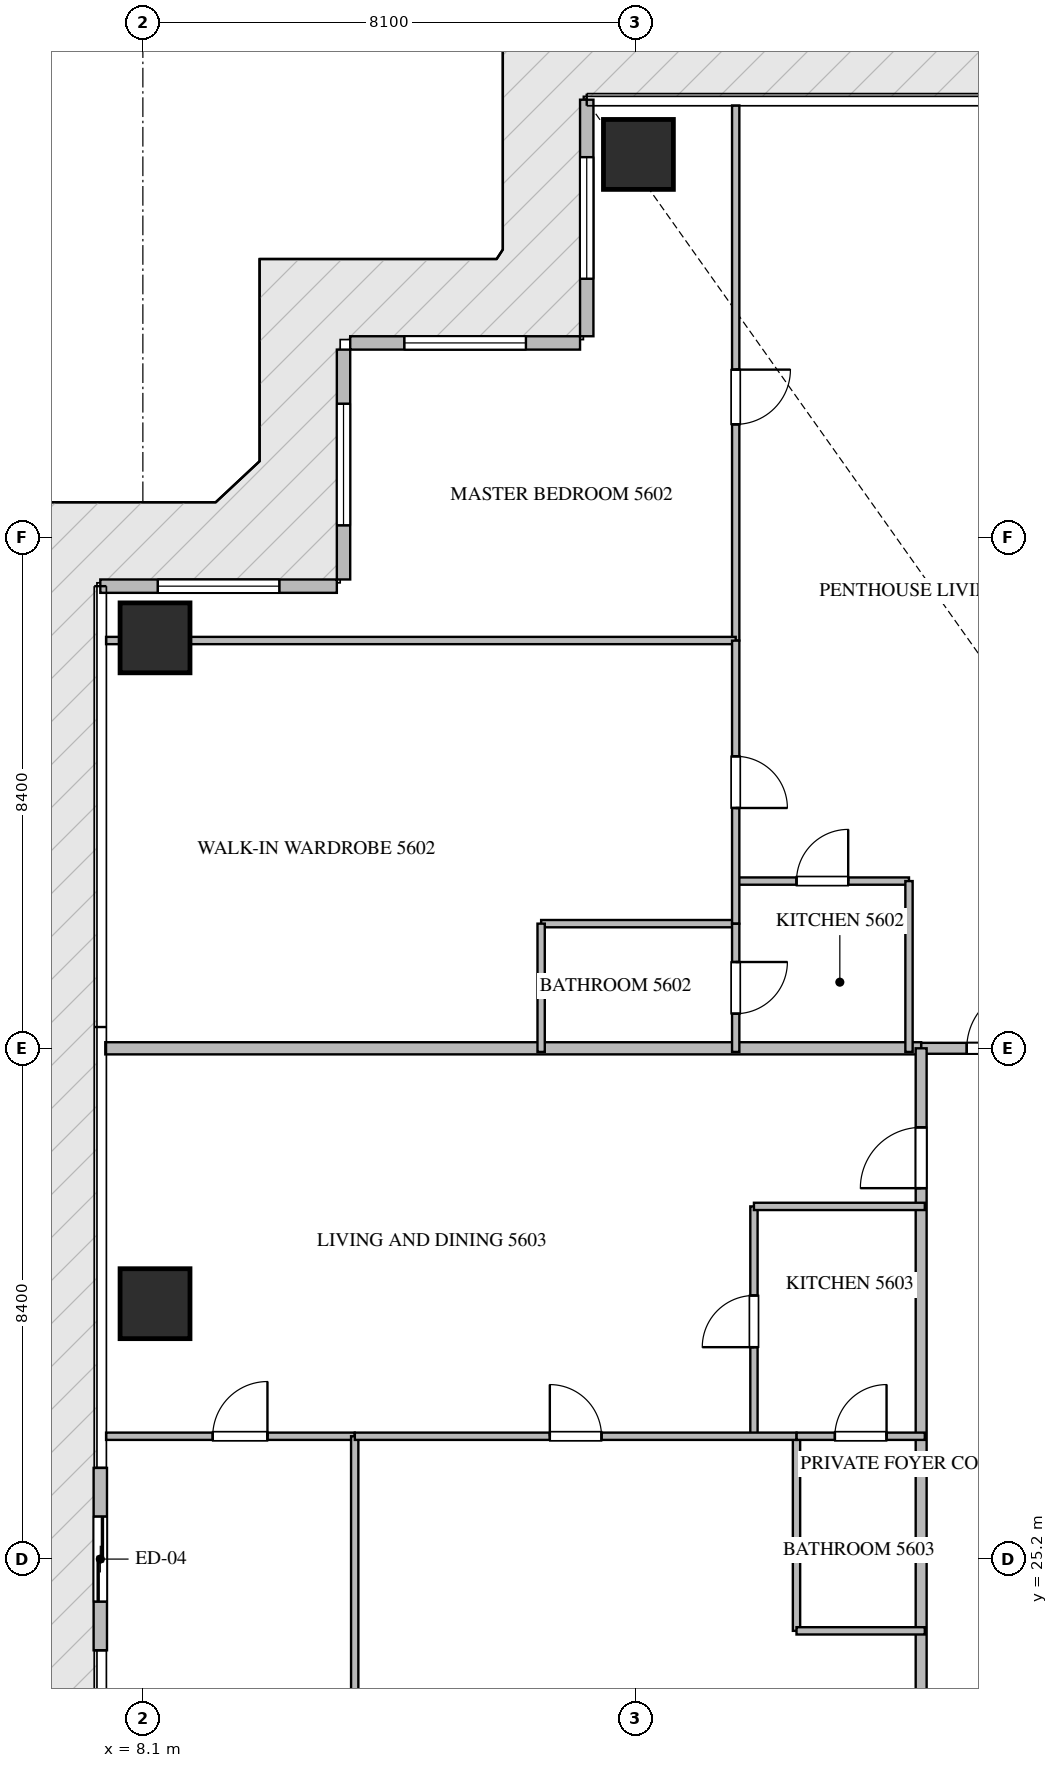
"""IFC4 building model, lengths in metres.
Left out: names, types, materials, properties, quantities, classifications, styles, units other than length and angle.
Written with IfcOpenShell. Run it as: python <this file> out.ifc"""

import sys

from ifc_helpers import new_model, si_unit, direction, frame, frame_2d, origin, origin_2d, place, context, subcontext, project, spatial, rectangle, extrude, source, transform, mapped, element, fill, save


model = new_model("IFC4")
c1 = context("Model", 3, precision=1e-05, world=origin(), true_north=direction((0.0, 1.0)))
c2 = subcontext(c1, "Body", "Model", "MODEL_VIEW")
j1 = project(units=[si_unit("LENGTHUNIT", "METRE"), si_unit("PLANEANGLEUNIT", "RADIAN")], contexts=[c1])
p1 = place(None, origin())
s1 = spatial("IfcSite", under=j1, at=p1, CompositionType="ELEMENT")
p2 = place(p1, origin())
s2 = spatial("IfcBuilding", under=s1, at=p2, CompositionType="ELEMENT")
p3 = place(p2, frame((0.0, 0.0, 225.85)))
s3 = spatial("IfcBuildingStorey", under=s2, at=p3, CompositionType="ELEMENT", Elevation=225.85)
m1 = source(origin(), c2, "Body", "SweptSolid", [
    extrude(rectangle(XDim=1.15, YDim=1.15, at=origin_2d()), origin(), (0.0, 0.0, 1.0), 3.85),
])
for number, where, z_axis, x_axis in (
    (1, (16.25, 48.3, -0.26), (0.0, 0.0, 1.0), (1.0, 0.0, 0.0)),
    (2, (8.3, 29.4, -0.26), (0.0, 0.0, 1.0), (1.0, 0.0, 0.0)),
    (3, (8.3, 40.35, -0.26), (0.0, 0.0, 1.0), (1.0, 0.0, 0.0)),
):
    element("IfcColumn", number, at=place(p3, frame(where, z_axis=z_axis, x_axis=x_axis)), inside=s3, PredefinedType="COLUMN", context=c2, shape_type="MappedRepresentation", body=[
        mapped(m1, transform((0.0, 0.0, 0.0), scale=1.0)),
    ])
p4 = place(p3, frame((15.4, 49.2, 0.0), z_axis=(0.0, 0.0, 1.0), x_axis=(0.0, -1.0, 0.0)))
e4 = element("IfcWall", 4, at=p4, inside=s3, PredefinedType="ELEMENTEDWALL", context=c2, shape_type="SweptSolid", body=[
    extrude(rectangle(XDim=3.89, YDim=0.22, at=frame_2d((1.945, 0.0))), origin(), (0.0, 0.0, 1.0), 3.575),
])
p5 = place(p4, frame((0.945, 0.0, 0.65)))
e5 = element("IfcOpeningElement", 5, at=p5, cuts=e4, PredefinedType="OPENING", context=c2, shape_type="SweptSolid", body=[
    extrude(rectangle(XDim=2.0, YDim=2.2, at=frame_2d((1.0, 1.1))), frame((0.0, 0.12, 0.0), z_axis=(0.0, -1.0, 0.0), x_axis=(1.0, 0.0, 0.0)), (0.0, 0.0, 1.0), 0.24),
])
p6 = place(p3, frame((15.29, 45.2, 0.0), z_axis=(0.0, 0.0, 1.0), x_axis=(-1.0, 0.0, 0.0)))
e6 = element("IfcWall", 6, at=p6, inside=s3, PredefinedType="ELEMENTEDWALL", context=c2, shape_type="SweptSolid", body=[
    extrude(rectangle(XDim=3.78, YDim=0.22, at=frame_2d((1.89, 0.0))), origin(), (0.0, 0.0, 1.0), 3.575),
])
p7 = place(p6, frame((0.89, 0.0, 0.65)))
e7 = element("IfcOpeningElement", 7, at=p7, cuts=e6, PredefinedType="OPENING", context=c2, shape_type="SweptSolid", body=[
    extrude(rectangle(XDim=2.0, YDim=2.2, at=frame_2d((1.0, 1.1))), frame((0.0, 0.12, 0.0), z_axis=(0.0, -1.0, 0.0), x_axis=(1.0, 0.0, 0.0)), (0.0, 0.0, 1.0), 0.24),
])
p8 = place(p3, frame((11.4, 45.09, 0.0), z_axis=(0.0, 0.0, 1.0), x_axis=(0.0, -1.0, 0.0)))
e8 = element("IfcWall", 8, at=p8, inside=s3, PredefinedType="ELEMENTEDWALL", context=c2, shape_type="SweptSolid", body=[
    extrude(rectangle(XDim=3.78, YDim=0.22, at=frame_2d((1.89, 0.0))), origin(), (0.0, 0.0, 1.0), 3.575),
])
p9 = place(p8, frame((0.89, 0.0, 0.65)))
e9 = element("IfcOpeningElement", 9, at=p9, cuts=e8, PredefinedType="OPENING", context=c2, shape_type="SweptSolid", body=[
    extrude(rectangle(XDim=2.0, YDim=2.2, at=frame_2d((1.0, 1.1))), frame((0.0, 0.12, 0.0), z_axis=(0.0, -1.0, 0.0), x_axis=(1.0, 0.0, 0.0)), (0.0, 0.0, 1.0), 0.24),
])
p10 = place(p3, frame((11.29, 41.2, 0.0), z_axis=(0.0, 0.0, 1.0), x_axis=(-1.0, 0.0, 0.0)))
e10 = element("IfcWall", 10, at=p10, inside=s3, PredefinedType="ELEMENTEDWALL", context=c2, shape_type="SweptSolid", body=[
    extrude(rectangle(XDim=3.89, YDim=0.22, at=frame_2d((1.945, 0.0))), origin(), (0.0, 0.0, 1.0), 3.575),
])
p11 = place(p10, frame((0.945, 0.0, 0.65)))
e11 = element("IfcOpeningElement", 11, at=p11, cuts=e10, PredefinedType="OPENING", context=c2, shape_type="SweptSolid", body=[
    extrude(rectangle(XDim=2.0, YDim=2.2, at=frame_2d((1.0, 1.1))), frame((0.0, 0.12, 0.0), z_axis=(0.0, -1.0, 0.0), x_axis=(1.0, 0.0, 0.0)), (0.0, 0.0, 1.0), 0.24),
])
p12 = place(p3, frame((7.4, 26.7, 0.0), z_axis=(0.0, 0.0, 1.0), x_axis=(0.0, -1.0, 0.0)))
e12 = element("IfcWall", 12, at=p12, inside=s3, PredefinedType="ELEMENTEDWALL", context=c2, shape_type="SweptSolid", body=[
    extrude(rectangle(XDim=3.0, YDim=0.22, at=frame_2d((1.5, 0.0))), origin(), (0.0, 0.0, 1.0), 3.575),
])
p13 = place(p12, frame((0.8, 0.0, 0.0)))
e13 = element("IfcOpeningElement", 13, at=p13, cuts=e12, PredefinedType="OPENING", context=c2, shape_type="SweptSolid", body=[
    extrude(rectangle(XDim=1.4, YDim=2.25, at=frame_2d((0.7, 1.125))), frame((0.0, 0.12, 0.0), z_axis=(0.0, -1.0, 0.0), x_axis=(1.0, 0.0, 0.0)), (0.0, 0.0, 1.0), 0.24),
])
p14 = place(p3, frame((7.482, 33.6, 0.0), z_axis=(0.0, 0.0, 1.0), x_axis=(1.0, 0.0, 0.0)))
e14 = element("IfcWall", 14, at=p14, inside=s3, PredefinedType="PARTITIONING", context=c2, shape_type="SweptSolid", body=[
    extrude(rectangle(XDim=13.418, YDim=0.2, at=frame_2d((6.709, 0.0))), origin(), (0.0, 0.0, 1.0), 3.59),
])
p15 = place(p3, frame((20.902, 33.6, 0.0), z_axis=(0.0, 0.0, 1.0), x_axis=(1.0, 0.0, 0.0)))
e15 = element("IfcWall", 15, at=p15, inside=s3, PredefinedType="PARTITIONING", context=c2, shape_type="SweptSolid", body=[
    extrude(rectangle(XDim=2.496, YDim=0.18, at=frame_2d((1.248, 0.0))), origin(), (0.0, 0.0, 1.0), 3.59),
])
p16 = place(p15, frame((0.748, 0.0, 0.0)))
e16 = element("IfcOpeningElement", 16, at=p16, cuts=e15, PredefinedType="OPENING", context=c2, shape_type="SweptSolid", body=[
    extrude(rectangle(XDim=1.0, YDim=2.15, at=frame_2d((0.5, 1.075))), frame((0.0, 0.1, 0.0), z_axis=(0.0, -1.0, 0.0), x_axis=(1.0, 0.0, 0.0)), (0.0, 0.0, 1.0), 0.2),
])
p17 = place(p3, frame((20.9, 16.8, 0.0), z_axis=(0.0, 0.0, 1.0), x_axis=(0.0, 1.0, 0.0)))
e17 = element("IfcWall", 17, at=p17, inside=s3, PredefinedType="PARTITIONING", context=c2, shape_type="SweptSolid", body=[
    extrude(rectangle(XDim=16.8, YDim=0.18, at=frame_2d((8.4, 0.0))), origin(), (0.0, 0.0, 1.0), 3.59),
])
p18 = place(p17, frame((14.5, 0.0, 0.0)))
e18 = element("IfcOpeningElement", 18, at=p18, cuts=e17, PredefinedType="OPENING", context=c2, shape_type="SweptSolid", body=[
    extrude(rectangle(XDim=1.0, YDim=2.15, at=frame_2d((0.5, 1.075))), frame((0.0, 0.1, 0.0), z_axis=(0.0, -1.0, 0.0), x_axis=(1.0, 0.0, 0.0)), (0.0, 0.0, 1.0), 0.2),
])
p19 = place(p3, frame((17.85, 36.35, 0.0), z_axis=(0.0, 0.0, 1.0), x_axis=(1.0, 0.0, 0.0)))
e19 = element("IfcWall", 19, at=p19, inside=s3, PredefinedType="PARTITIONING", context=c2, shape_type="SweptSolid", body=[
    extrude(rectangle(XDim=2.85, YDim=0.12, at=frame_2d((1.425, 0.0))), origin(), (0.0, 0.0, 1.0), 3.59),
])
p20 = place(p19, frame((1.0, 0.0, 0.0)))
e20 = element("IfcOpeningElement", 20, at=p20, cuts=e19, PredefinedType="OPENING", context=c2, shape_type="SweptSolid", body=[
    extrude(rectangle(XDim=0.85, YDim=2.1, at=frame_2d((0.425, 1.05))), frame((0.0, 0.07, 0.0), z_axis=(0.0, -1.0, 0.0), x_axis=(1.0, 0.0, 0.0)), (0.0, 0.0, 1.0), 0.14),
])
p21 = place(p3, frame((20.7, 36.35, 0.0), z_axis=(0.0, 0.0, 1.0), x_axis=(0.0, -1.0, 0.0)))
e21 = element("IfcWall", 21, at=p21, inside=s3, PredefinedType="PARTITIONING", context=c2, shape_type="SweptSolid", body=[
    extrude(rectangle(XDim=2.81, YDim=0.12, at=frame_2d((1.405, 0.0))), origin(), (0.0, 0.0, 1.0), 3.59),
])
p22 = place(p3, frame((17.85, 49.105, 0.0), z_axis=(0.0, 0.0, 1.0), x_axis=(0.0, -1.0, 0.0)))
e22 = element("IfcWall", 22, at=p22, inside=s3, PredefinedType="PARTITIONING", context=c2, shape_type="SweptSolid", body=[
    extrude(rectangle(XDim=8.799, YDim=0.12, at=frame_2d((4.399, 0.0))), origin(), (0.0, 0.0, 1.0), 3.59),
])
p23 = place(p22, frame((4.344, 0.0, 0.0)))
e23 = element("IfcOpeningElement", 23, at=p23, cuts=e22, PredefinedType="OPENING", context=c2, shape_type="SweptSolid", body=[
    extrude(rectangle(XDim=0.9, YDim=2.1, at=frame_2d((0.45, 1.05))), frame((0.0, 0.07, 0.0), z_axis=(0.0, -1.0, 0.0), x_axis=(1.0, 0.0, 0.0)), (0.0, 0.0, 1.0), 0.14),
])
p24 = place(p3, frame((7.495, 40.306, 0.0), z_axis=(0.0, 0.0, 1.0), x_axis=(1.0, 0.0, 0.0)))
e24 = element("IfcWall", 24, at=p24, inside=s3, PredefinedType="PARTITIONING", context=c2, shape_type="SweptSolid", body=[
    extrude(rectangle(XDim=10.355, YDim=0.12, at=frame_2d((5.177, 0.0))), origin(), (0.0, 0.0, 1.0), 3.122),
])
p25 = place(p3, frame((14.65, 35.65, 0.0), z_axis=(0.0, 0.0, 1.0), x_axis=(1.0, 0.0, 0.0)))
e25 = element("IfcWall", 25, at=p25, inside=s3, PredefinedType="PARTITIONING", context=c2, shape_type="SweptSolid", body=[
    extrude(rectangle(XDim=3.2, YDim=0.12, at=frame_2d((1.6, 0.0))), origin(), (0.0, 0.0, 1.0), 3.59),
])
p26 = place(p3, frame((14.65, 35.65, 0.0), z_axis=(0.0, 0.0, 1.0), x_axis=(0.0, -1.0, 0.0)))
e26 = element("IfcWall", 26, at=p26, inside=s3, PredefinedType="PARTITIONING", context=c2, shape_type="SweptSolid", body=[
    extrude(rectangle(XDim=2.11, YDim=0.12, at=frame_2d((1.055, 0.0))), origin(), (0.0, 0.0, 1.0), 3.59),
])
p27 = place(p3, frame((17.85, 40.304, 0.0), z_axis=(0.0, 0.0, 1.0), x_axis=(0.0, -1.0, 0.0)))
e27 = element("IfcWall", 27, at=p27, inside=s3, PredefinedType="PARTITIONING", context=c2, shape_type="SweptSolid", body=[
    extrude(rectangle(XDim=4.654, YDim=0.12, at=frame_2d((2.327, 0.0))), origin(), (0.0, 0.0, 1.0), 3.59),
])
p28 = place(p27, frame((1.902, 0.0, 0.0)))
e28 = element("IfcOpeningElement", 28, at=p28, cuts=e27, PredefinedType="OPENING", context=c2, shape_type="SweptSolid", body=[
    extrude(rectangle(XDim=0.85, YDim=2.1, at=frame_2d((0.425, 1.05))), frame((0.0, 0.07, 0.0), z_axis=(0.0, -1.0, 0.0), x_axis=(1.0, 0.0, 0.0)), (0.0, 0.0, 1.0), 0.14),
])
p29 = place(p3, frame((17.85, 35.648, 0.0), z_axis=(0.0, 0.0, 1.0), x_axis=(0.0, -1.0, 0.0)))
e29 = element("IfcWall", 29, at=p29, inside=s3, PredefinedType="PARTITIONING", context=c2, shape_type="SweptSolid", body=[
    extrude(rectangle(XDim=2.108, YDim=0.12, at=frame_2d((1.054, 0.0))), origin(), (0.0, 0.0, 1.0), 3.59),
])
p30 = place(p29, frame((0.629, 0.0, 0.0)))
e30 = element("IfcOpeningElement", 30, at=p30, cuts=e29, PredefinedType="OPENING", context=c2, shape_type="SweptSolid", body=[
    extrude(rectangle(XDim=0.85, YDim=2.1, at=frame_2d((0.425, 1.05))), frame((0.0, 0.07, 0.0), z_axis=(0.0, -1.0, 0.0), x_axis=(1.0, 0.0, 0.0)), (0.0, 0.0, 1.0), 0.14),
])
p31 = place(p3, frame((18.15, 27.22, 0.0), z_axis=(0.0, 0.0, 1.0), x_axis=(0.0, 1.0, 0.0)))
e31 = element("IfcWall", 31, at=p31, inside=s3, PredefinedType="PARTITIONING", context=c2, shape_type="SweptSolid", body=[
    extrude(rectangle(XDim=3.78, YDim=0.12, at=frame_2d((1.89, 0.0))), origin(), (0.0, 0.0, 1.0), 3.59),
])
p32 = place(p31, frame((1.465, 0.0, 0.0)))
e32 = element("IfcOpeningElement", 32, at=p32, cuts=e31, PredefinedType="OPENING", context=c2, shape_type="SweptSolid", body=[
    extrude(rectangle(XDim=0.85, YDim=2.1, at=frame_2d((0.425, 1.05))), frame((0.0, 0.07, 0.0), z_axis=(0.0, -1.0, 0.0), x_axis=(1.0, 0.0, 0.0)), (0.0, 0.0, 1.0), 0.14),
])
p33 = place(p3, frame((18.15, 31.0, 0.0), z_axis=(0.0, 0.0, 1.0), x_axis=(1.0, 0.0, 0.0)))
e33 = element("IfcWall", 33, at=p33, inside=s3, PredefinedType="PARTITIONING", context=c2, shape_type="SweptSolid", body=[
    extrude(rectangle(XDim=2.81, YDim=0.12, at=frame_2d((1.405, 0.0))), origin(), (0.0, 0.0, 1.0), 3.59),
])
p34 = place(p3, frame((7.495, 27.22, 0.0), z_axis=(0.0, 0.0, 1.0), x_axis=(1.0, 0.0, 0.0)))
e34 = element("IfcWall", 34, at=p34, inside=s3, PredefinedType="PARTITIONING", context=c2, shape_type="SweptSolid", body=[
    extrude(rectangle(XDim=4.089, YDim=0.12, at=frame_2d((2.044, 0.0))), origin(), (0.0, 0.0, 1.0), 3.59),
])
p35 = place(p34, frame((1.754, 0.0, 0.0)))
e35 = element("IfcOpeningElement", 35, at=p35, cuts=e34, PredefinedType="OPENING", context=c2, shape_type="SweptSolid", body=[
    extrude(rectangle(XDim=0.9, YDim=2.1, at=frame_2d((0.45, 1.05))), frame((0.0, 0.07, 0.0), z_axis=(0.0, -1.0, 0.0), x_axis=(1.0, 0.0, 0.0)), (0.0, 0.0, 1.0), 0.14),
])
p36 = place(p3, frame((11.584, 16.74, 0.0), z_axis=(0.0, 0.0, 1.0), x_axis=(0.0, 1.0, 0.0)))
e36 = element("IfcWall", 36, at=p36, inside=s3, PredefinedType="PARTITIONING", context=c2, shape_type="SweptSolid", body=[
    extrude(rectangle(XDim=10.48, YDim=0.12, at=frame_2d((5.24, 0.0))), origin(), (0.0, 0.0, 1.0), 3.59),
])
p37 = place(p3, frame((18.85, 24.02, 0.0), z_axis=(0.0, 0.0, 1.0), x_axis=(0.0, 1.0, 0.0)))
e37 = element("IfcWall", 37, at=p37, inside=s3, PredefinedType="PARTITIONING", context=c2, shape_type="SweptSolid", body=[
    extrude(rectangle(XDim=3.2, YDim=0.12, at=frame_2d((1.6, 0.0))), origin(), (0.0, 0.0, 1.0), 3.59),
])
p38 = place(p3, frame((18.85, 24.02, 0.0), z_axis=(0.0, 0.0, 1.0), x_axis=(1.0, 0.0, 0.0)))
e38 = element("IfcWall", 38, at=p38, inside=s3, PredefinedType="PARTITIONING", context=c2, shape_type="SweptSolid", body=[
    extrude(rectangle(XDim=2.11, YDim=0.12, at=frame_2d((1.055, 0.0))), origin(), (0.0, 0.0, 1.0), 3.59),
])
p39 = place(p3, frame((11.586, 27.22, 0.0), z_axis=(0.0, 0.0, 1.0), x_axis=(1.0, 0.0, 0.0)))
e39 = element("IfcWall", 39, at=p39, inside=s3, PredefinedType="PARTITIONING", context=c2, shape_type="SweptSolid", body=[
    extrude(rectangle(XDim=7.264, YDim=0.12, at=frame_2d((3.632, 0.0))), origin(), (0.0, 0.0, 1.0), 3.59),
])
p40 = place(p39, frame((3.207, 0.0, 0.0)))
e40 = element("IfcOpeningElement", 40, at=p40, cuts=e39, PredefinedType="OPENING", context=c2, shape_type="SweptSolid", body=[
    extrude(rectangle(XDim=0.85, YDim=2.1, at=frame_2d((0.425, 1.05))), frame((0.0, 0.07, 0.0), z_axis=(0.0, -1.0, 0.0), x_axis=(1.0, 0.0, 0.0)), (0.0, 0.0, 1.0), 0.14),
])
p41 = place(p3, frame((18.852, 27.22, 0.0), z_axis=(0.0, 0.0, 1.0), x_axis=(1.0, 0.0, 0.0)))
e41 = element("IfcWall", 41, at=p41, inside=s3, PredefinedType="PARTITIONING", context=c2, shape_type="SweptSolid", body=[
    extrude(rectangle(XDim=2.108, YDim=0.12, at=frame_2d((1.054, 0.0))), origin(), (0.0, 0.0, 1.0), 3.59),
])
p42 = place(p41, frame((0.629, 0.0, 0.0)))
e42 = element("IfcOpeningElement", 42, at=p42, cuts=e41, PredefinedType="OPENING", context=c2, shape_type="SweptSolid", body=[
    extrude(rectangle(XDim=0.85, YDim=2.1, at=frame_2d((0.425, 1.05))), frame((0.0, 0.07, 0.0), z_axis=(0.0, -1.0, 0.0), x_axis=(1.0, 0.0, 0.0)), (0.0, 0.0, 1.0), 0.14),
])
m2 = source(origin(), c2, "Body", "SweptSolid", [
    extrude(rectangle(XDim=2.0, YDim=2.2, at=frame_2d((1.0, 1.1))), frame((0.0, 0.03, 0.0), z_axis=(0.0, -1.0, 0.0), x_axis=(1.0, 0.0, 0.0)), (0.0, 0.0, 1.0), 0.06),
])
p43 = place(p5, origin())
e43 = element("IfcWindow", 43, at=p43, inside=s3, PartitioningType="SINGLE_PANEL", PredefinedType="WINDOW", context=c2, shape_type="MappedRepresentation", body=[
    mapped(m2, transform((0.0, 0.0, 0.0), scale=1.0)),
])
fill(e5, e43)
p44 = place(p7, origin())
e44 = element("IfcWindow", 44, at=p44, inside=s3, PartitioningType="SINGLE_PANEL", PredefinedType="WINDOW", context=c2, shape_type="MappedRepresentation", body=[
    mapped(m2, transform((0.0, 0.0, 0.0), scale=1.0)),
])
fill(e7, e44)
p45 = place(p9, origin())
e45 = element("IfcWindow", 45, at=p45, inside=s3, PartitioningType="SINGLE_PANEL", PredefinedType="WINDOW", context=c2, shape_type="MappedRepresentation", body=[
    mapped(m2, transform((0.0, 0.0, 0.0), scale=1.0)),
])
fill(e9, e45)
p46 = place(p11, origin())
e46 = element("IfcWindow", 46, at=p46, inside=s3, PartitioningType="SINGLE_PANEL", PredefinedType="WINDOW", context=c2, shape_type="MappedRepresentation", body=[
    mapped(m2, transform((0.0, 0.0, 0.0), scale=1.0)),
])
fill(e11, e46)
m3 = source(origin(), c2, "Body", "SweptSolid", [
    extrude(rectangle(XDim=1.4, YDim=2.25, at=frame_2d((0.7, 1.125))), frame((0.0, 0.025, 0.0), z_axis=(0.0, -1.0, 0.0), x_axis=(1.0, 0.0, 0.0)), (0.0, 0.0, 1.0), 0.05),
])
p47 = place(p13, origin())
e47 = element("IfcDoor", 47, at=p47, inside=s3, OperationType="SLIDING_TO_LEFT", PredefinedType="DOOR", context=c2, shape_type="MappedRepresentation", body=[
    mapped(m3, transform((0.0, 0.0, 0.0), scale=1.0)),
])
fill(e13, e47)
m4 = source(origin(), c2, "Body", "SweptSolid", [
    extrude(rectangle(XDim=1.0, YDim=2.15, at=frame_2d((0.5, 1.075))), frame((0.0, 0.025, 0.0), z_axis=(0.0, -1.0, 0.0), x_axis=(1.0, 0.0, 0.0)), (0.0, 0.0, 1.0), 0.05),
])
p48 = place(p16, origin())
e48 = element("IfcDoor", 48, at=p48, inside=s3, OperationType="SINGLE_SWING_RIGHT", PredefinedType="DOOR", context=c2, shape_type="MappedRepresentation", body=[
    mapped(m4, transform((0.0, 0.0, 0.0), scale=1.0)),
])
fill(e16, e48)
p49 = place(p18, origin())
e49 = element("IfcDoor", 49, at=p49, inside=s3, OperationType="SINGLE_SWING_LEFT", PredefinedType="DOOR", context=c2, shape_type="MappedRepresentation", body=[
    mapped(m4, transform((0.0, 0.0, 0.0), scale=1.0)),
])
fill(e18, e49)
m5 = source(origin(), c2, "Body", "SweptSolid", [
    extrude(rectangle(XDim=0.85, YDim=2.1, at=frame_2d((0.425, 1.05))), frame((0.0, 0.025, 0.0), z_axis=(0.0, -1.0, 0.0), x_axis=(1.0, 0.0, 0.0)), (0.0, 0.0, 1.0), 0.05),
])
p50 = place(p20, origin())
e50 = element("IfcDoor", 50, at=p50, inside=s3, OperationType="SINGLE_SWING_RIGHT", PredefinedType="DOOR", context=c2, shape_type="MappedRepresentation", body=[
    mapped(m5, transform((0.0, 0.0, 0.0), scale=1.0)),
])
fill(e20, e50)
m6 = source(origin(), c2, "Body", "SweptSolid", [
    extrude(rectangle(XDim=0.9, YDim=2.1, at=frame_2d((0.45, 1.05))), frame((0.0, 0.025, 0.0), z_axis=(0.0, -1.0, 0.0), x_axis=(1.0, 0.0, 0.0)), (0.0, 0.0, 1.0), 0.05),
])
p51 = place(p23, origin())
e51 = element("IfcDoor", 51, at=p51, inside=s3, OperationType="SINGLE_SWING_LEFT", PredefinedType="DOOR", context=c2, shape_type="MappedRepresentation", body=[
    mapped(m6, transform((0.0, 0.0, 0.0), scale=1.0)),
])
fill(e23, e51)
p52 = place(p28, origin())
e52 = element("IfcDoor", 52, at=p52, inside=s3, OperationType="SINGLE_SWING_RIGHT", PredefinedType="DOOR", context=c2, shape_type="MappedRepresentation", body=[
    mapped(m5, transform((0.0, 0.0, 0.0), scale=1.0)),
])
fill(e28, e52)
p53 = place(p30, origin())
e53 = element("IfcDoor", 53, at=p53, inside=s3, OperationType="SINGLE_SWING_LEFT", PredefinedType="DOOR", context=c2, shape_type="MappedRepresentation", body=[
    mapped(m5, transform((0.0, 0.0, 0.0), scale=1.0)),
])
fill(e30, e53)
p54 = place(p32, origin())
e54 = element("IfcDoor", 54, at=p54, inside=s3, OperationType="SINGLE_SWING_LEFT", PredefinedType="DOOR", context=c2, shape_type="MappedRepresentation", body=[
    mapped(m5, transform((0.0, 0.0, 0.0), scale=1.0)),
])
fill(e32, e54)
p55 = place(p35, origin())
e55 = element("IfcDoor", 55, at=p55, inside=s3, OperationType="SINGLE_SWING_RIGHT", PredefinedType="DOOR", context=c2, shape_type="MappedRepresentation", body=[
    mapped(m6, transform((0.0, 0.0, 0.0), scale=1.0)),
])
fill(e35, e55)
p56 = place(p40, origin())
e56 = element("IfcDoor", 56, at=p56, inside=s3, OperationType="SINGLE_SWING_LEFT", PredefinedType="DOOR", context=c2, shape_type="MappedRepresentation", body=[
    mapped(m5, transform((0.0, 0.0, 0.0), scale=1.0)),
])
fill(e40, e56)
p57 = place(p42, origin())
e57 = element("IfcDoor", 57, at=p57, inside=s3, OperationType="SINGLE_SWING_RIGHT", PredefinedType="DOOR", context=c2, shape_type="MappedRepresentation", body=[
    mapped(m5, transform((0.0, 0.0, 0.0), scale=1.0)),
])
fill(e42, e57)
save(model, sys.argv[1])
